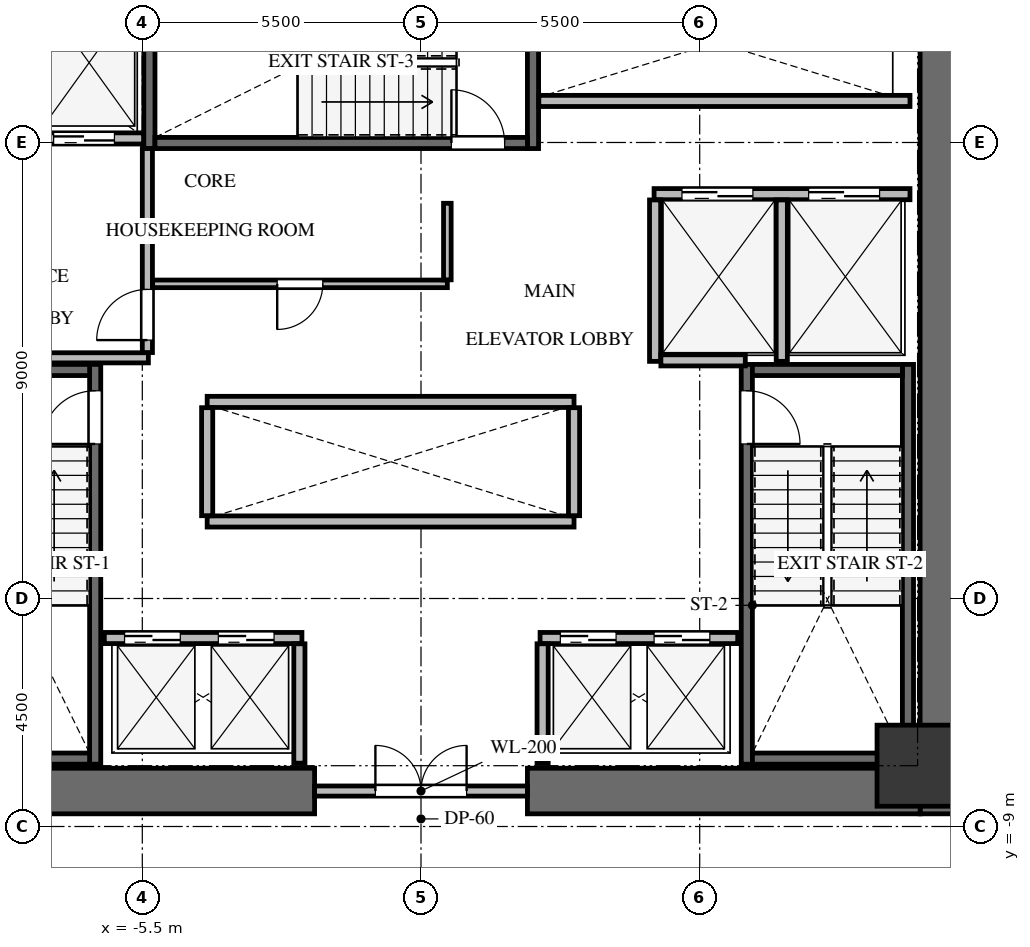
"""IFC4 building model, lengths in metres.
Left out: names, types, materials, properties, quantities, classifications, styles, units other than length and angle.
Written with IfcOpenShell. Run it as: python <this file> out.ifc"""

import sys

from ifc_helpers import new_model, si_unit, direction, frame, frame_2d, origin, origin_2d, place, context, subcontext, project, spatial, rectangle, extrude, source, transform, mapped, element, fill, save


model = new_model("IFC4")
c1 = context("Model", 3, precision=1e-05, world=origin(), true_north=direction((0.0, 1.0)))
c2 = subcontext(c1, "Body", "Model", "MODEL_VIEW")
j1 = project(units=[si_unit("LENGTHUNIT", "METRE"), si_unit("PLANEANGLEUNIT", "RADIAN")], contexts=[c1])
p1 = place(None, origin())
s1 = spatial("IfcSite", under=j1, at=p1, CompositionType="ELEMENT")
p2 = place(p1, origin())
s2 = spatial("IfcBuilding", under=s1, at=p2, CompositionType="ELEMENT")
p3 = place(p2, frame((0.0, 0.0, 84.3)))
s3 = spatial("IfcBuildingStorey", under=s2, at=p3, CompositionType="ELEMENT", Elevation=84.3)
p4 = place(p3, frame((10.3, -8.75, 0.0), z_axis=(0.0, 0.0, 1.0), x_axis=(0.0, 1.0, 0.0)))
e1 = element("IfcWall", 1, at=p4, inside=s3, PredefinedType="SHEAR", context=c2, shape_type="SweptSolid", body=[
    extrude(rectangle(XDim=17.5, YDim=0.9, at=frame_2d((8.75, 0.0))), origin(), (0.0, 0.0, 1.0), 4.2),
])
for number, where, z_axis, x_axis in (
    (2, (-9.85, -8.3, 0.0), (0.0, 0.0, 1.0), (1.0, 0.0, 0.0)),
    (3, (2.1, -8.3, 0.0), (0.0, 0.0, 1.0), (1.0, 0.0, 0.0)),
):
    element("IfcWall", number, at=place(p3, frame(where, z_axis=z_axis, x_axis=x_axis)), inside=s3, PredefinedType="SHEAR", context=c2, shape_type="SweptSolid", body=[
        extrude(rectangle(XDim=7.75, YDim=0.9, at=frame_2d((3.875, 0.0))), origin(), (0.0, 0.0, 1.0), 4.2),
    ])
p5 = place(p3, frame((-6.43, -7.77, -0.24), z_axis=(0.0, 0.0, 1.0), x_axis=(0.0, 1.0, 0.0)))
e4 = element("IfcWall", 4, at=p5, inside=s3, PredefinedType="SHEAR", context=c2, shape_type="SweptSolid", body=[
    extrude(rectangle(XDim=7.89, YDim=0.22, at=frame_2d((3.945, 0.0))), origin(), (0.0, 0.0, 1.0), 4.14),
])
p6 = place(p5, frame((6.32, 0.0, 0.0)))
e5 = element("IfcOpeningElement", 5, at=p6, cuts=e4, PredefinedType="OPENING", context=c2, shape_type="SweptSolid", body=[
    extrude(rectangle(XDim=1.05, YDim=2.15, at=frame_2d((0.525, 1.075))), frame((0.0, 0.12, 0.0), z_axis=(0.0, -1.0, 0.0), x_axis=(1.0, 0.0, 0.0)), (0.0, 0.0, 1.0), 0.24),
])
for number, where, z_axis, x_axis in (
    (6, (-9.5, -7.66, -0.24), (0.0, 0.0, 1.0), (1.0, 0.0, 0.0)),
    (7, (-6.54, 0.01, -0.24), (0.0, 0.0, 1.0), (-1.0, 0.0, 0.0)),
):
    element("IfcWall", number, at=place(p3, frame(where, z_axis=z_axis, x_axis=x_axis)), inside=s3, PredefinedType="SHEAR", context=c2, shape_type="SweptSolid", body=[
        extrude(rectangle(XDim=2.96, YDim=0.22, at=frame_2d((1.48, 0.0))), origin(), (0.0, 0.0, 1.0), 4.14),
    ])
p7 = place(p3, frame((9.61, -7.77, -0.24), z_axis=(0.0, 0.0, 1.0), x_axis=(0.0, 1.0, 0.0)))
e8 = element("IfcWall", 8, at=p7, inside=s3, PredefinedType="SHEAR", context=c2, shape_type="SweptSolid", body=[
    extrude(rectangle(XDim=7.89, YDim=0.22, at=frame_2d((3.945, 0.0))), origin(), (0.0, 0.0, 1.0), 4.14),
])
p8 = place(p3, frame((6.43, 0.12, -0.24), z_axis=(0.0, 0.0, 1.0), x_axis=(0.0, -1.0, 0.0)))
e9 = element("IfcWall", 9, at=p8, inside=s3, PredefinedType="SHEAR", context=c2, shape_type="SweptSolid", body=[
    extrude(rectangle(XDim=7.89, YDim=0.22, at=frame_2d((3.945, 0.0))), origin(), (0.0, 0.0, 1.0), 4.14),
])
p9 = place(p8, frame((0.52, 0.0, 0.0)))
e10 = element("IfcOpeningElement", 10, at=p9, cuts=e9, PredefinedType="OPENING", context=c2, shape_type="SweptSolid", body=[
    extrude(rectangle(XDim=1.05, YDim=2.15, at=frame_2d((0.525, 1.075))), frame((0.0, 0.12, 0.0), z_axis=(0.0, -1.0, 0.0), x_axis=(1.0, 0.0, 0.0)), (0.0, 0.0, 1.0), 0.24),
])
for number, where, z_axis, x_axis in (
    (11, (6.54, -7.66, -0.24), (0.0, 0.0, 1.0), (1.0, 0.0, 0.0)),
    (12, (9.5, 0.01, -0.24), (0.0, 0.0, 1.0), (-1.0, 0.0, 0.0)),
):
    element("IfcWall", number, at=place(p3, frame(where, z_axis=z_axis, x_axis=x_axis)), inside=s3, PredefinedType="SHEAR", context=c2, shape_type="SweptSolid", body=[
        extrude(rectangle(XDim=2.96, YDim=0.22, at=frame_2d((1.48, 0.0))), origin(), (0.0, 0.0, 1.0), 4.14),
    ])
for number, where, z_axis, x_axis in (
    (13, (2.21, 4.38, -0.24), (0.0, 0.0, 1.0), (0.0, 1.0, 0.0)),
    (14, (-5.36, 7.78, -0.24), (0.0, 0.0, 1.0), (0.0, -1.0, 0.0)),
):
    element("IfcWall", number, at=place(p3, frame(where, z_axis=z_axis, x_axis=x_axis)), inside=s3, PredefinedType="SHEAR", context=c2, shape_type="SweptSolid", body=[
        extrude(rectangle(XDim=3.4, YDim=0.22, at=frame_2d((1.7, 0.0))), origin(), (0.0, 0.0, 1.0), 4.14),
    ])
p10 = place(p3, frame((-5.25, 4.49, -0.24), z_axis=(0.0, 0.0, 1.0), x_axis=(1.0, 0.0, 0.0)))
e15 = element("IfcWall", 15, at=p10, inside=s3, PredefinedType="SHEAR", context=c2, shape_type="SweptSolid", body=[
    extrude(rectangle(XDim=7.35, YDim=0.22, at=frame_2d((3.675, 0.0))), origin(), (0.0, 0.0, 1.0), 4.14),
])
p11 = place(p10, frame((5.85, 0.0, 0.0)))
e16 = element("IfcOpeningElement", 16, at=p11, cuts=e15, PredefinedType="OPENING", context=c2, shape_type="SweptSolid", body=[
    extrude(rectangle(XDim=1.05, YDim=2.15, at=frame_2d((0.525, 1.075))), frame((0.0, 0.12, 0.0), z_axis=(0.0, -1.0, 0.0), x_axis=(1.0, 0.0, 0.0)), (0.0, 0.0, 1.0), 0.24),
])
m1 = source(origin(), c2, "Body", "SweptSolid", [
    extrude(rectangle(XDim=1.6, YDim=1.6, at=origin_2d()), origin(), (0.0, 0.0, 1.0), 4.14),
])
p12 = place(p3, frame((9.8, -7.8, -0.24), z_axis=(0.0, 0.0, 1.0), x_axis=(1.0, 0.0, 0.0)))
e17 = element("IfcColumn", 17, at=p12, inside=s3, PredefinedType="COLUMN", context=c2, shape_type="MappedRepresentation", body=[
    mapped(m1, transform((0.0, 0.0, 0.0), x_axis=(1.0, 0.0, 0.0), y_axis=(0.0, 1.0, 0.0), z_axis=(0.0, 0.0, 1.0), scale=1.0)),
])
p13 = place(p3, frame((-2.1, -8.3, 0.0), z_axis=(0.0, 0.0, 1.0), x_axis=(1.0, 0.0, 0.0)))
e18 = element("IfcWall", 18, at=p13, inside=s3, PredefinedType="SOLIDWALL", context=c2, shape_type="SweptSolid", body=[
    extrude(rectangle(XDim=4.2, YDim=0.2, at=frame_2d((2.1, 0.0))), origin(), (0.0, 0.0, 1.0), 3.885),
])
p14 = place(p13, frame((1.2, 0.0, 0.0)))
e19 = element("IfcOpeningElement", 19, at=p14, cuts=e18, PredefinedType="OPENING", context=c2, shape_type="SweptSolid", body=[
    extrude(rectangle(XDim=1.8, YDim=2.15, at=frame_2d((0.9, 1.075))), frame((0.0, 0.11, 0.0), z_axis=(0.0, -1.0, 0.0), x_axis=(1.0, 0.0, 0.0)), (0.0, 0.0, 1.0), 0.22),
])
p15 = place(p3, frame((-9.65, 4.58, 0.0), z_axis=(0.0, 0.0, 1.0), x_axis=(1.0, 0.0, 0.0)))
e20 = element("IfcWall", 20, at=p15, inside=s3, PredefinedType="SOLIDWALL", context=c2, shape_type="SweptSolid", body=[
    extrude(rectangle(XDim=4.175, YDim=0.22, at=frame_2d((2.087, 0.0))), origin(), (0.0, 0.0, 1.0), 3.885),
])
p16 = place(p15, frame((0.4, 0.0, 0.0)))
e21 = element("IfcOpeningElement", 21, at=p16, cuts=e20, PredefinedType="OPENING", context=c2, shape_type="SweptSolid", body=[
    extrude(rectangle(XDim=1.2, YDim=2.15, at=frame_2d((0.6, 1.075))), frame((0.0, 0.12, 0.0), z_axis=(0.0, -1.0, 0.0), x_axis=(1.0, 0.0, 0.0)), (0.0, 0.0, 1.0), 0.24),
])
p17 = place(p15, frame((2.4, 0.0, 0.0)))
e22 = element("IfcOpeningElement", 22, at=p17, cuts=e20, PredefinedType="OPENING", context=c2, shape_type="SweptSolid", body=[
    extrude(rectangle(XDim=1.2, YDim=2.15, at=frame_2d((0.6, 1.075))), frame((0.0, 0.12, 0.0), z_axis=(0.0, -1.0, 0.0), x_axis=(1.0, 0.0, 0.0)), (0.0, 0.0, 1.0), 0.24),
])
p18 = place(p3, frame((-9.65, 0.25, 0.0), z_axis=(0.0, 0.0, 1.0), x_axis=(1.0, 0.0, 0.0)))
e23 = element("IfcWall", 23, at=p18, inside=s3, PredefinedType="SOLIDWALL", context=c2, shape_type="SweptSolid", body=[
    extrude(rectangle(XDim=4.27, YDim=0.2, at=frame_2d((2.135, 0.0))), origin(), (0.0, 0.0, 1.0), 3.885),
])
p19 = place(p3, frame((-5.4, 0.354, 0.0), z_axis=(0.0, 0.0, 1.0), x_axis=(0.0, 1.0, 0.0)))
e24 = element("IfcWall", 24, at=p19, inside=s3, PredefinedType="SOLIDWALL", context=c2, shape_type="SweptSolid", body=[
    extrude(rectangle(XDim=4.026, YDim=0.2, at=frame_2d((2.013, 0.0))), origin(), (0.0, 0.0, 1.0), 3.885),
])
p20 = place(p19, frame((0.246, 0.0, 0.0)))
e25 = element("IfcOpeningElement", 25, at=p20, cuts=e24, PredefinedType="OPENING", context=c2, shape_type="SweptSolid", body=[
    extrude(rectangle(XDim=1.0, YDim=2.15, at=frame_2d((0.5, 1.075))), frame((0.0, 0.11, 0.0), z_axis=(0.0, -1.0, 0.0), x_axis=(1.0, 0.0, 0.0)), (0.0, 0.0, 1.0), 0.22),
])
p21 = place(p3, frame((4.6, 3.48, 0.0), z_axis=(0.0, 0.0, 1.0), x_axis=(1.0, 0.0, 0.0)))
e26 = element("IfcWall", 26, at=p21, inside=s3, PredefinedType="SOLIDWALL", context=c2, shape_type="SweptSolid", body=[
    extrude(rectangle(XDim=5.05, YDim=0.22, at=frame_2d((2.525, 0.0))), origin(), (0.0, 0.0, 1.0), 3.885),
])
p22 = place(p21, frame((0.55, 0.0, 0.0)))
e27 = element("IfcOpeningElement", 27, at=p22, cuts=e26, PredefinedType="OPENING", context=c2, shape_type="SweptSolid", body=[
    extrude(rectangle(XDim=1.4, YDim=2.15, at=frame_2d((0.7, 1.075))), frame((0.0, 0.12, 0.0), z_axis=(0.0, -1.0, 0.0), x_axis=(1.0, 0.0, 0.0)), (0.0, 0.0, 1.0), 0.24),
])
p23 = place(p21, frame((3.05, 0.0, 0.0)))
e28 = element("IfcOpeningElement", 28, at=p23, cuts=e26, PredefinedType="OPENING", context=c2, shape_type="SweptSolid", body=[
    extrude(rectangle(XDim=1.4, YDim=2.15, at=frame_2d((0.7, 1.075))), frame((0.0, 0.12, 0.0), z_axis=(0.0, -1.0, 0.0), x_axis=(1.0, 0.0, 0.0)), (0.0, 0.0, 1.0), 0.24),
])
for number, where, z_axis, x_axis in (
    (29, (4.62, 0.18, 0.0), (0.0, 0.0, 1.0), (0.0, 1.0, 0.0)),
    (30, (7.12, 0.18, 0.0), (0.0, 0.0, 1.0), (0.0, 1.0, 0.0)),
):
    element("IfcWall", number, at=place(p3, frame(where, z_axis=z_axis, x_axis=x_axis)), inside=s3, PredefinedType="SOLIDWALL", context=c2, shape_type="SweptSolid", body=[
        extrude(rectangle(XDim=3.186, YDim=0.22, at=frame_2d((1.593, 0.0))), origin(), (0.0, 0.0, 1.0), 3.885),
    ])
p24 = place(p3, frame((4.734, 0.2, 0.0), z_axis=(0.0, 0.0, 1.0), x_axis=(1.0, 0.0, 0.0)))
e31 = element("IfcWall", 31, at=p24, inside=s3, PredefinedType="SOLIDWALL", context=c2, shape_type="SweptSolid", body=[
    extrude(rectangle(XDim=1.666, YDim=0.22, at=frame_2d((0.833, 0.0))), origin(), (0.0, 0.0, 1.0), 3.885),
])
p25 = place(p3, frame((-6.25, -5.28, 0.0), z_axis=(0.0, 0.0, 1.0), x_axis=(1.0, 0.0, 0.0)))
e32 = element("IfcWall", 32, at=p25, inside=s3, PredefinedType="SOLIDWALL", context=c2, shape_type="SweptSolid", body=[
    extrude(rectangle(XDim=3.9, YDim=0.22, at=frame_2d((1.95, 0.0))), origin(), (0.0, 0.0, 1.0), 3.885),
])
p26 = place(p25, frame((0.4, 0.0, 0.0)))
e33 = element("IfcOpeningElement", 33, at=p26, cuts=e32, PredefinedType="OPENING", context=c2, shape_type="SweptSolid", body=[
    extrude(rectangle(XDim=1.1, YDim=2.15, at=frame_2d((0.55, 1.075))), frame((0.0, 0.12, 0.0), z_axis=(0.0, -1.0, 0.0), x_axis=(1.0, 0.0, 0.0)), (0.0, 0.0, 1.0), 0.24),
])
p27 = place(p25, frame((2.25, 0.0, 0.0)))
e34 = element("IfcOpeningElement", 34, at=p27, cuts=e32, PredefinedType="OPENING", context=c2, shape_type="SweptSolid", body=[
    extrude(rectangle(XDim=1.1, YDim=2.15, at=frame_2d((0.55, 1.075))), frame((0.0, 0.12, 0.0), z_axis=(0.0, -1.0, 0.0), x_axis=(1.0, 0.0, 0.0)), (0.0, 0.0, 1.0), 0.24),
])
p28 = place(p3, frame((2.35, -5.28, 0.0), z_axis=(0.0, 0.0, 1.0), x_axis=(1.0, 0.0, 0.0)))
e35 = element("IfcWall", 35, at=p28, inside=s3, PredefinedType="SOLIDWALL", context=c2, shape_type="SweptSolid", body=[
    extrude(rectangle(XDim=3.9, YDim=0.22, at=frame_2d((1.95, 0.0))), origin(), (0.0, 0.0, 1.0), 3.885),
])
p29 = place(p28, frame((0.4, 0.0, 0.0)))
e36 = element("IfcOpeningElement", 36, at=p29, cuts=e35, PredefinedType="OPENING", context=c2, shape_type="SweptSolid", body=[
    extrude(rectangle(XDim=1.1, YDim=2.15, at=frame_2d((0.55, 1.075))), frame((0.0, 0.12, 0.0), z_axis=(0.0, -1.0, 0.0), x_axis=(1.0, 0.0, 0.0)), (0.0, 0.0, 1.0), 0.24),
])
p30 = place(p28, frame((2.25, 0.0, 0.0)))
e37 = element("IfcOpeningElement", 37, at=p30, cuts=e35, PredefinedType="OPENING", context=c2, shape_type="SweptSolid", body=[
    extrude(rectangle(XDim=1.1, YDim=2.15, at=frame_2d((0.55, 1.075))), frame((0.0, 0.12, 0.0), z_axis=(0.0, -1.0, 0.0), x_axis=(1.0, 0.0, 0.0)), (0.0, 0.0, 1.0), 0.24),
])
for number, where, z_axis, x_axis in (
    (38, (-2.4, -7.75, 0.0), (0.0, 0.0, 1.0), (0.0, 1.0, 0.0)),
    (39, (2.4, -7.75, 0.0), (0.0, 0.0, 1.0), (0.0, 1.0, 0.0)),
):
    element("IfcWall", number, at=place(p3, frame(where, z_axis=z_axis, x_axis=x_axis)), inside=s3, PredefinedType="SOLIDWALL", context=c2, shape_type="SweptSolid", body=[
        extrude(rectangle(XDim=2.356, YDim=0.22, at=frame_2d((1.178, 0.0))), origin(), (0.0, 0.0, 1.0), 3.885),
    ])
for number, where, z_axis, x_axis in (
    (40, (-4.22, -2.98, 0.0), (0.0, 0.0, 1.0), (1.0, 0.0, 0.0)),
    (41, (-4.22, -0.62, 0.0), (0.0, 0.0, 1.0), (1.0, 0.0, 0.0)),
):
    element("IfcWall", number, at=place(p3, frame(where, z_axis=z_axis, x_axis=x_axis)), inside=s3, PredefinedType="SOLIDWALL", context=c2, shape_type="SweptSolid", body=[
        extrude(rectangle(XDim=7.24, YDim=0.22, at=frame_2d((3.62, 0.0))), origin(), (0.0, 0.0, 1.0), 3.885),
    ])
for number, where, z_axis, x_axis in (
    (42, (-4.22, -2.866, 0.0), (0.0, 0.0, 1.0), (0.0, 1.0, 0.0)),
    (43, (3.02, -2.866, 0.0), (0.0, 0.0, 1.0), (0.0, 1.0, 0.0)),
):
    element("IfcWall", number, at=place(p3, frame(where, z_axis=z_axis, x_axis=x_axis)), inside=s3, PredefinedType="SOLIDWALL", context=c2, shape_type="SweptSolid", body=[
        extrude(rectangle(XDim=2.132, YDim=0.22, at=frame_2d((1.066, 0.0))), origin(), (0.0, 0.0, 1.0), 3.885),
    ])
p31 = place(p3, frame((2.325, 5.32, 0.0), z_axis=(0.0, 0.0, 1.0), x_axis=(1.0, 0.0, 0.0)))
e44 = element("IfcWall", 44, at=p31, inside=s3, PredefinedType="SOLIDWALL", context=c2, shape_type="SweptSolid", body=[
    extrude(rectangle(XDim=7.325, YDim=0.22, at=frame_2d((3.663, 0.0))), origin(), (0.0, 0.0, 1.0), 3.885),
])
p32 = place(p3, frame((0.52, 1.71, 0.0), z_axis=(0.0, 0.0, 1.0), x_axis=(-1.0, 0.0, 0.0)))
e45 = element("IfcWall", 45, at=p32, inside=s3, PredefinedType="PARTITIONING", context=c2, shape_type="SweptSolid", body=[
    extrude(rectangle(XDim=5.816, YDim=0.15, at=frame_2d((2.908, 0.0))), origin(), (0.0, 0.0, 1.0), 3.885),
])
p33 = place(p32, frame((2.458, 0.0, 0.0)))
e46 = element("IfcOpeningElement", 46, at=p33, cuts=e45, PredefinedType="OPENING", context=c2, shape_type="SweptSolid", body=[
    extrude(rectangle(XDim=0.9, YDim=2.05, at=frame_2d((0.45, 1.025))), frame((0.0, 0.085, 0.0), z_axis=(0.0, -1.0, 0.0), x_axis=(1.0, 0.0, 0.0)), (0.0, 0.0, 1.0), 0.17),
])
p34 = place(p3, frame((0.52, 3.3, 0.0), z_axis=(0.0, 0.0, 1.0), x_axis=(0.0, -1.0, 0.0)))
e47 = element("IfcWall", 47, at=p34, inside=s3, PredefinedType="PARTITIONING", context=c2, shape_type="SweptSolid", body=[
    extrude(rectangle(XDim=1.511, YDim=0.15, at=frame_2d((0.755, 0.0))), origin(), (0.0, 0.0, 1.0), 3.885),
])
m2 = source(origin(), c2, "Body", "SweptSolid", [
    extrude(rectangle(XDim=1.05, YDim=2.15, at=frame_2d((0.525, 1.075))), frame((0.0, 0.025, 0.0), z_axis=(0.0, -1.0, 0.0), x_axis=(1.0, 0.0, 0.0)), (0.0, 0.0, 1.0), 0.05),
])
p35 = place(p6, origin())
e48 = element("IfcDoor", 48, at=p35, inside=s3, OperationType="SINGLE_SWING_LEFT", PredefinedType="DOOR", context=c2, shape_type="MappedRepresentation", body=[
    mapped(m2, transform((0.0, 0.0, 0.0), x_axis=(1.0, 0.0, 0.0), y_axis=(0.0, 1.0, 0.0), z_axis=(0.0, 0.0, 1.0), scale=1.0)),
])
fill(e5, e48)
m3 = source(origin(), c2, "Body", "SweptSolid", [
    extrude(rectangle(XDim=1.05, YDim=2.15, at=frame_2d((0.525, 1.075))), frame((0.0, 0.025, 0.0), z_axis=(0.0, -1.0, 0.0), x_axis=(1.0, 0.0, 0.0)), (0.0, 0.0, 1.0), 0.05),
])
p36 = place(p9, origin())
e49 = element("IfcDoor", 49, at=p36, inside=s3, OperationType="SINGLE_SWING_RIGHT", PredefinedType="DOOR", context=c2, shape_type="MappedRepresentation", body=[
    mapped(m3, transform((0.0, 0.0, 0.0), x_axis=(1.0, 0.0, 0.0), y_axis=(0.0, 1.0, 0.0), z_axis=(0.0, 0.0, 1.0), scale=1.0)),
])
fill(e10, e49)
p37 = place(p11, origin())
e50 = element("IfcDoor", 50, at=p37, inside=s3, OperationType="SINGLE_SWING_LEFT", PredefinedType="DOOR", context=c2, shape_type="MappedRepresentation", body=[
    mapped(m2, transform((0.0, 0.0, 0.0), x_axis=(1.0, 0.0, 0.0), y_axis=(0.0, 1.0, 0.0), z_axis=(0.0, 0.0, 1.0), scale=1.0)),
])
fill(e16, e50)
m4 = source(origin(), c2, "Body", "SweptSolid", [
    extrude(rectangle(XDim=1.8, YDim=2.15, at=frame_2d((0.9, 1.075))), frame((0.0, 0.025, 0.0), z_axis=(0.0, -1.0, 0.0), x_axis=(1.0, 0.0, 0.0)), (0.0, 0.0, 1.0), 0.05),
])
p38 = place(p14, origin())
e51 = element("IfcDoor", 51, at=p38, inside=s3, OperationType="DOUBLE_DOOR_SINGLE_SWING", PredefinedType="DOOR", context=c2, shape_type="MappedRepresentation", body=[
    mapped(m4, transform((0.0, 0.0, 0.0), x_axis=(1.0, 0.0, 0.0), y_axis=(0.0, 1.0, 0.0), z_axis=(0.0, 0.0, 1.0), scale=1.0)),
])
fill(e19, e51)
m5 = source(origin(), c2, "Body", "SweptSolid", [
    extrude(rectangle(XDim=1.2, YDim=2.15, at=frame_2d((0.6, 1.075))), frame((0.0, 0.025, 0.0), z_axis=(0.0, -1.0, 0.0), x_axis=(1.0, 0.0, 0.0)), (0.0, 0.0, 1.0), 0.05),
])
p39 = place(p17, origin())
e52 = element("IfcDoor", 52, at=p39, inside=s3, OperationType="DOUBLE_DOOR_SLIDING", PredefinedType="DOOR", context=c2, shape_type="MappedRepresentation", body=[
    mapped(m5, transform((0.0, 0.0, 0.0), x_axis=(1.0, 0.0, 0.0), y_axis=(0.0, 1.0, 0.0), z_axis=(0.0, 0.0, 1.0), scale=1.0)),
])
fill(e22, e52)
m6 = source(origin(), c2, "Body", "SweptSolid", [
    extrude(rectangle(XDim=1.0, YDim=2.15, at=frame_2d((0.5, 1.075))), frame((0.0, 0.025, 0.0), z_axis=(0.0, -1.0, 0.0), x_axis=(1.0, 0.0, 0.0)), (0.0, 0.0, 1.0), 0.05),
])
p40 = place(p20, origin())
e53 = element("IfcDoor", 53, at=p40, inside=s3, OperationType="SINGLE_SWING_LEFT", PredefinedType="DOOR", context=c2, shape_type="MappedRepresentation", body=[
    mapped(m6, transform((0.0, 0.0, 0.0), x_axis=(1.0, 0.0, 0.0), y_axis=(0.0, 1.0, 0.0), z_axis=(0.0, 0.0, 1.0), scale=1.0)),
])
fill(e25, e53)
m7 = source(origin(), c2, "Body", "SweptSolid", [
    extrude(rectangle(XDim=1.4, YDim=2.15, at=frame_2d((0.7, 1.075))), frame((0.0, 0.025, 0.0), z_axis=(0.0, -1.0, 0.0), x_axis=(1.0, 0.0, 0.0)), (0.0, 0.0, 1.0), 0.05),
])
p41 = place(p22, origin())
e54 = element("IfcDoor", 54, at=p41, inside=s3, OperationType="DOUBLE_DOOR_SLIDING", PredefinedType="DOOR", context=c2, shape_type="MappedRepresentation", body=[
    mapped(m7, transform((0.0, 0.0, 0.0), x_axis=(1.0, 0.0, 0.0), y_axis=(0.0, 1.0, 0.0), z_axis=(0.0, 0.0, 1.0), scale=1.0)),
])
fill(e27, e54)
p42 = place(p23, origin())
e55 = element("IfcDoor", 55, at=p42, inside=s3, OperationType="DOUBLE_DOOR_SLIDING", PredefinedType="DOOR", context=c2, shape_type="MappedRepresentation", body=[
    mapped(m7, transform((0.0, 0.0, 0.0), x_axis=(1.0, 0.0, 0.0), y_axis=(0.0, 1.0, 0.0), z_axis=(0.0, 0.0, 1.0), scale=1.0)),
])
fill(e28, e55)
m8 = source(origin(), c2, "Body", "SweptSolid", [
    extrude(rectangle(XDim=1.1, YDim=2.15, at=frame_2d((0.55, 1.075))), frame((0.0, 0.025, 0.0), z_axis=(0.0, -1.0, 0.0), x_axis=(1.0, 0.0, 0.0)), (0.0, 0.0, 1.0), 0.05),
])
p43 = place(p26, origin())
e56 = element("IfcDoor", 56, at=p43, inside=s3, OperationType="DOUBLE_DOOR_SLIDING", PredefinedType="DOOR", context=c2, shape_type="MappedRepresentation", body=[
    mapped(m8, transform((0.0, 0.0, 0.0), x_axis=(1.0, 0.0, 0.0), y_axis=(0.0, 1.0, 0.0), z_axis=(0.0, 0.0, 1.0), scale=1.0)),
])
fill(e33, e56)
p44 = place(p27, origin())
e57 = element("IfcDoor", 57, at=p44, inside=s3, OperationType="DOUBLE_DOOR_SLIDING", PredefinedType="DOOR", context=c2, shape_type="MappedRepresentation", body=[
    mapped(m8, transform((0.0, 0.0, 0.0), x_axis=(1.0, 0.0, 0.0), y_axis=(0.0, 1.0, 0.0), z_axis=(0.0, 0.0, 1.0), scale=1.0)),
])
fill(e34, e57)
p45 = place(p29, origin())
e58 = element("IfcDoor", 58, at=p45, inside=s3, OperationType="DOUBLE_DOOR_SLIDING", PredefinedType="DOOR", context=c2, shape_type="MappedRepresentation", body=[
    mapped(m8, transform((0.0, 0.0, 0.0), x_axis=(1.0, 0.0, 0.0), y_axis=(0.0, 1.0, 0.0), z_axis=(0.0, 0.0, 1.0), scale=1.0)),
])
fill(e36, e58)
p46 = place(p30, origin())
e59 = element("IfcDoor", 59, at=p46, inside=s3, OperationType="DOUBLE_DOOR_SLIDING", PredefinedType="DOOR", context=c2, shape_type="MappedRepresentation", body=[
    mapped(m8, transform((0.0, 0.0, 0.0), x_axis=(1.0, 0.0, 0.0), y_axis=(0.0, 1.0, 0.0), z_axis=(0.0, 0.0, 1.0), scale=1.0)),
])
fill(e37, e59)
m9 = source(origin(), c2, "Body", "SweptSolid", [
    extrude(rectangle(XDim=0.9, YDim=2.05, at=frame_2d((0.45, 1.025))), frame((0.0, 0.025, 0.0), z_axis=(0.0, -1.0, 0.0), x_axis=(1.0, 0.0, 0.0)), (0.0, 0.0, 1.0), 0.05),
])
p47 = place(p33, origin())
e60 = element("IfcDoor", 60, at=p47, inside=s3, OperationType="SINGLE_SWING_RIGHT", PredefinedType="DOOR", context=c2, shape_type="MappedRepresentation", body=[
    mapped(m9, transform((0.0, 0.0, 0.0), x_axis=(1.0, 0.0, 0.0), y_axis=(0.0, 1.0, 0.0), z_axis=(0.0, 0.0, 1.0), scale=1.0)),
])
fill(e46, e60)
save(model, sys.argv[1])
